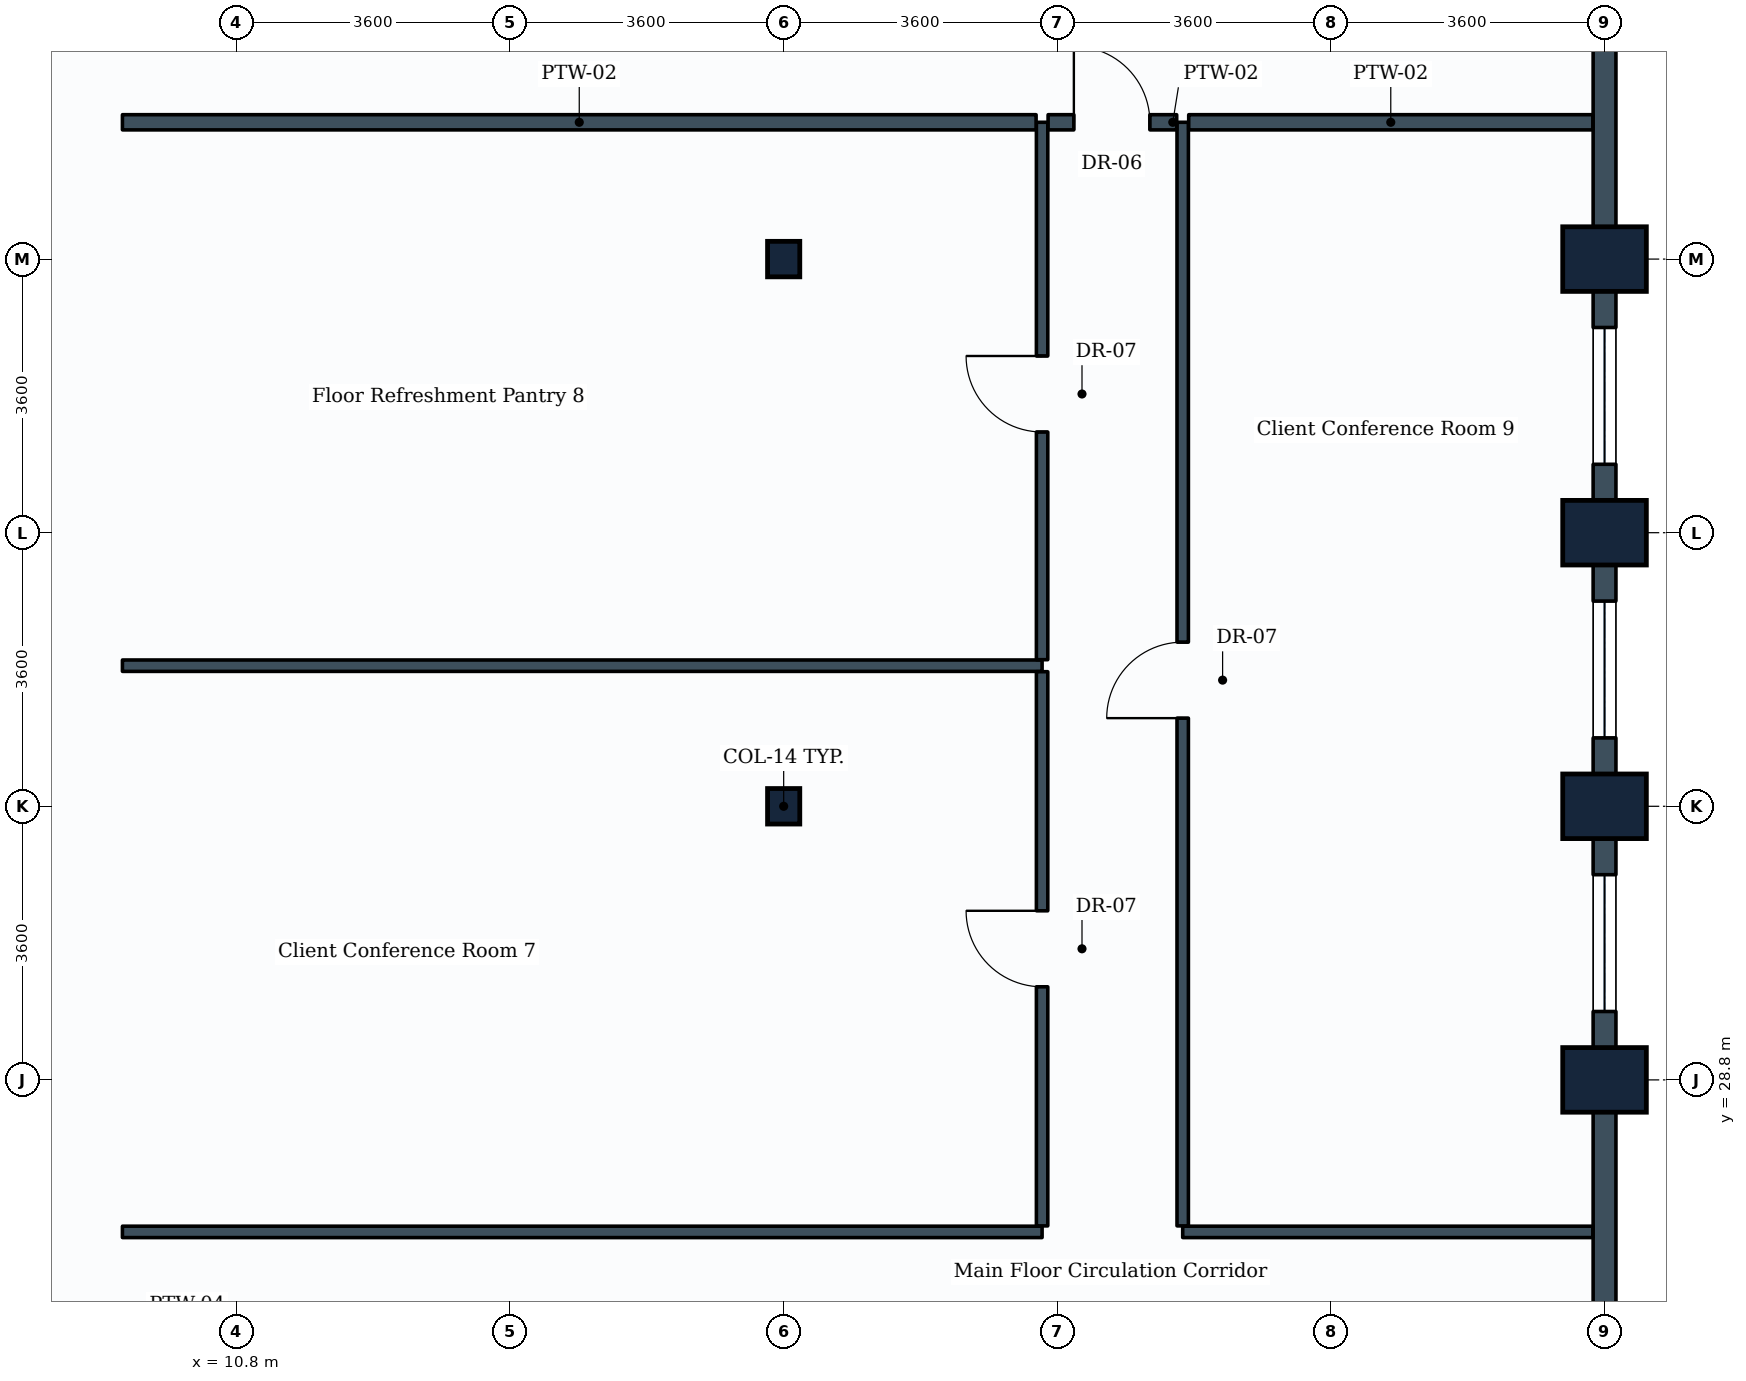
"""IFC4 building model, lengths in metres.
Left out: names, types, materials, properties, quantities, classifications, styles, units other than length and angle.
Written with IfcOpenShell. Run it as: python <this file> out.ifc"""

import sys

from ifc_helpers import new_model, si_unit, direction, frame, frame_2d, origin, origin_2d, place, context, subcontext, project, spatial, rectangle, i_section, extrude, element, fill, save


model = new_model("IFC4")
c1 = context("Model", 3, precision=1e-05, world=origin(), true_north=direction((0.0, 1.0)))
c2 = subcontext(c1, "Body", "Model", "MODEL_VIEW")
j1 = project(units=[si_unit("LENGTHUNIT", "METRE"), si_unit("PLANEANGLEUNIT", "RADIAN")], contexts=[c1])
p1 = place(None, origin())
s1 = spatial("IfcSite", under=j1, at=p1, CompositionType="ELEMENT")
p2 = place(p1, origin())
s2 = spatial("IfcBuilding", under=s1, at=p2, CompositionType="ELEMENT")
p3 = place(p2, frame((0.0, 0.0, 87.9)))
s3 = spatial("IfcBuildingStorey", under=s2, at=p3, CompositionType="ELEMENT", Elevation=87.9)
for number, where, z_axis, x_axis in (
    (1, (18.0, 32.4, 0.0), (0.0, 0.0, 1.0), (1.0, 0.0, 0.0)),
    (2, (18.0, 39.6, 0.0), (0.0, 0.0, 1.0), (1.0, 0.0, 0.0)),
):
    element("IfcColumn", number, at=place(p3, frame(where, z_axis=z_axis, x_axis=x_axis)), inside=s3, PredefinedType="COLUMN", context=c2, shape_type="SweptSolid", body=[
        extrude(i_section(OverallWidth=0.424, OverallDepth=0.467, WebThickness=0.033, FlangeThickness=0.053, FilletRadius=0.015, at=origin_2d()), origin(), (0.0, 0.0, 1.0), 3.9),
    ])
for number, where, z_axis, x_axis in (
    (3, (28.8, 28.8, 0.0), (0.0, 0.0, 1.0), (0.0, 1.0, 0.0)),
    (4, (28.8, 32.4, 0.0), (0.0, 0.0, 1.0), (0.0, 1.0, 0.0)),
    (5, (28.8, 36.0, 0.0), (0.0, 0.0, 1.0), (0.0, 1.0, 0.0)),
    (6, (28.8, 39.6, 0.0), (0.0, 0.0, 1.0), (0.0, 1.0, 0.0)),
):
    element("IfcColumn", number, at=place(p3, frame(where, z_axis=z_axis, x_axis=x_axis)), inside=s3, PredefinedType="COLUMN", context=c2, shape_type="SweptSolid", body=[
        extrude(rectangle(XDim=0.85, YDim=1.1, at=origin_2d()), origin(), (0.0, 0.0, 1.0), 3.9),
    ])
p4 = place(p3, frame((28.8, 28.8, 0.0), z_axis=(0.0, 0.0, 1.0), x_axis=(0.0, -1.0, 0.0)))
e7 = element("IfcWall", 7, at=p4, inside=s3, PredefinedType="STANDARD", context=c2, shape_type="SweptSolid", body=[
    extrude(rectangle(XDim=3.6, YDim=0.3, at=frame_2d((1.8, 0.0))), origin(), (0.0, 0.0, 1.0), 3.19),
])
p5 = place(p3, frame((28.8, 32.4, 0.0), z_axis=(0.0, 0.0, 1.0), x_axis=(0.0, -1.0, 0.0)))
e8 = element("IfcWall", 8, at=p5, inside=s3, PredefinedType="STANDARD", context=c2, shape_type="SweptSolid", body=[
    extrude(rectangle(XDim=3.6, YDim=0.3, at=frame_2d((1.8, 0.0))), origin(), (0.0, 0.0, 1.0), 2.93),
])
p6 = place(p5, frame((0.9, 0.0, 0.85)))
e9 = element("IfcOpeningElement", 9, at=p6, cuts=e8, PredefinedType="OPENING", context=c2, shape_type="SweptSolid", body=[
    extrude(rectangle(XDim=1.8, YDim=1.35, at=frame_2d((0.9, 0.675))), frame((0.0, 0.16, 0.0), z_axis=(0.0, -1.0, 0.0), x_axis=(1.0, 0.0, 0.0)), (0.0, 0.0, 1.0), 0.32),
])
p7 = place(p3, frame((28.8, 36.0, 0.0), z_axis=(0.0, 0.0, 1.0), x_axis=(0.0, -1.0, 0.0)))
e10 = element("IfcWall", 10, at=p7, inside=s3, PredefinedType="STANDARD", context=c2, shape_type="SweptSolid", body=[
    extrude(rectangle(XDim=3.6, YDim=0.3, at=frame_2d((1.8, 0.0))), origin(), (0.0, 0.0, 1.0), 2.93),
])
p8 = place(p7, frame((0.9, 0.0, 0.85)))
e11 = element("IfcOpeningElement", 11, at=p8, cuts=e10, PredefinedType="OPENING", context=c2, shape_type="SweptSolid", body=[
    extrude(rectangle(XDim=1.8, YDim=1.35, at=frame_2d((0.9, 0.675))), frame((0.0, 0.16, 0.0), z_axis=(0.0, -1.0, 0.0), x_axis=(1.0, 0.0, 0.0)), (0.0, 0.0, 1.0), 0.32),
])
p9 = place(p3, frame((28.8, 39.6, 0.0), z_axis=(0.0, 0.0, 1.0), x_axis=(0.0, -1.0, 0.0)))
e12 = element("IfcWall", 12, at=p9, inside=s3, PredefinedType="STANDARD", context=c2, shape_type="SweptSolid", body=[
    extrude(rectangle(XDim=3.6, YDim=0.3, at=frame_2d((1.8, 0.0))), origin(), (0.0, 0.0, 1.0), 2.93),
])
p10 = place(p9, frame((0.9, 0.0, 0.85)))
e13 = element("IfcOpeningElement", 13, at=p10, cuts=e12, PredefinedType="OPENING", context=c2, shape_type="SweptSolid", body=[
    extrude(rectangle(XDim=1.8, YDim=1.35, at=frame_2d((0.9, 0.675))), frame((0.0, 0.16, 0.0), z_axis=(0.0, -1.0, 0.0), x_axis=(1.0, 0.0, 0.0)), (0.0, 0.0, 1.0), 0.32),
])
p11 = place(p3, frame((28.8, 43.2, 0.0), z_axis=(0.0, 0.0, 1.0), x_axis=(0.0, -1.0, 0.0)))
e14 = element("IfcWall", 14, at=p11, inside=s3, PredefinedType="STANDARD", context=c2, shape_type="SweptSolid", body=[
    extrude(rectangle(XDim=3.6, YDim=0.3, at=frame_2d((1.8, 0.0))), origin(), (0.0, 0.0, 1.0), 2.93),
])
for number, where, z_axis, x_axis in (
    (15, (9.3, 26.8, 0.0), (0.0, 0.0, 1.0), (1.0, 0.0, 0.0)),
    (16, (9.3, 34.25, 0.0), (0.0, 0.0, 1.0), (1.0, 0.0, 0.0)),
):
    element("IfcWall", number, at=place(p3, frame(where, z_axis=z_axis, x_axis=x_axis)), inside=s3, PredefinedType="PARTITIONING", context=c2, shape_type="SweptSolid", body=[
        extrude(rectangle(XDim=12.1, YDim=0.15, at=frame_2d((6.05, 0.0))), origin(), (0.0, 0.0, 1.0), 3.18),
    ])
p12 = place(p3, frame((21.4, 26.879, 0.0), z_axis=(0.0, 0.0, 1.0), x_axis=(0.0, 1.0, 0.0)))
e17 = element("IfcWall", 17, at=p12, inside=s3, PredefinedType="PARTITIONING", context=c2, shape_type="SweptSolid", body=[
    extrude(rectangle(XDim=7.292, YDim=0.15, at=frame_2d((3.646, 0.0))), origin(), (0.0, 0.0, 1.0), 3.19),
])
p13 = place(p12, frame((3.146, 0.0, 0.0)))
e18 = element("IfcOpeningElement", 18, at=p13, cuts=e17, PredefinedType="OPENING", context=c2, shape_type="SweptSolid", body=[
    extrude(rectangle(XDim=1.0, YDim=2.1, at=frame_2d((0.5, 1.05))), frame((0.0, 0.085, 0.0), z_axis=(0.0, -1.0, 0.0), x_axis=(1.0, 0.0, 0.0)), (0.0, 0.0, 1.0), 0.17),
])
p14 = place(p3, frame((21.4, 34.329, 0.0), z_axis=(0.0, 0.0, 1.0), x_axis=(0.0, 1.0, 0.0)))
e19 = element("IfcWall", 19, at=p14, inside=s3, PredefinedType="PARTITIONING", context=c2, shape_type="SweptSolid", body=[
    extrude(rectangle(XDim=7.071, YDim=0.15, at=frame_2d((3.535, 0.0))), origin(), (0.0, 0.0, 1.0), 3.18),
])
p15 = place(p14, frame((2.996, 0.0, 0.0)))
e20 = element("IfcOpeningElement", 20, at=p15, cuts=e19, PredefinedType="OPENING", context=c2, shape_type="SweptSolid", body=[
    extrude(rectangle(XDim=1.0, YDim=2.1, at=frame_2d((0.5, 1.05))), frame((0.0, 0.085, 0.0), z_axis=(0.0, -1.0, 0.0), x_axis=(1.0, 0.0, 0.0)), (0.0, 0.0, 1.0), 0.17),
])
p16 = place(p3, frame((23.25, 26.8, 0.0), z_axis=(0.0, 0.0, 1.0), x_axis=(1.0, 0.0, 0.0)))
e21 = element("IfcWall", 21, at=p16, inside=s3, PredefinedType="PARTITIONING", context=c2, shape_type="SweptSolid", body=[
    extrude(rectangle(XDim=5.396, YDim=0.15, at=frame_2d((2.698, 0.0))), origin(), (0.0, 0.0, 1.0), 3.635),
])
p17 = place(p3, frame((23.25, 26.879, 0.0), z_axis=(0.0, 0.0, 1.0), x_axis=(0.0, 1.0, 0.0)))
e22 = element("IfcWall", 22, at=p17, inside=s3, PredefinedType="PARTITIONING", context=c2, shape_type="SweptSolid", body=[
    extrude(rectangle(XDim=14.521, YDim=0.15, at=frame_2d((7.26, 0.0))), origin(), (0.0, 0.0, 1.0), 3.19),
])
p18 = place(p17, frame((6.681, 0.0, 0.0)))
e23 = element("IfcOpeningElement", 23, at=p18, cuts=e22, PredefinedType="OPENING", context=c2, shape_type="SweptSolid", body=[
    extrude(rectangle(XDim=1.0, YDim=2.1, at=frame_2d((0.5, 1.05))), frame((0.0, 0.085, 0.0), z_axis=(0.0, -1.0, 0.0), x_axis=(1.0, 0.0, 0.0)), (0.0, 0.0, 1.0), 0.17),
])
p19 = place(p3, frame((9.3, 41.4, 0.0), z_axis=(0.0, 0.0, 1.0), x_axis=(1.0, 0.0, 0.0)))
e24 = element("IfcWall", 24, at=p19, inside=s3, PredefinedType="PARTITIONING", context=c2, shape_type="SweptSolid", body=[
    extrude(rectangle(XDim=12.021, YDim=0.2, at=frame_2d((6.01, 0.0))), origin(), (0.0, 0.0, 1.0), 3.18),
])
p20 = place(p3, frame((23.329, 41.4, 0.0), z_axis=(0.0, 0.0, 1.0), x_axis=(1.0, 0.0, 0.0)))
e25 = element("IfcWall", 25, at=p20, inside=s3, PredefinedType="PARTITIONING", context=c2, shape_type="SweptSolid", body=[
    extrude(rectangle(XDim=5.317, YDim=0.2, at=frame_2d((2.658, 0.0))), origin(), (0.0, 0.0, 1.0), 2.93),
])
p21 = place(p3, frame((21.479, 41.4, 0.0), z_axis=(0.0, 0.0, 1.0), x_axis=(1.0, 0.0, 0.0)))
e26 = element("IfcWall", 26, at=p21, inside=s3, PredefinedType="PARTITIONING", context=c2, shape_type="SweptSolid", body=[
    extrude(rectangle(XDim=1.692, YDim=0.2, at=frame_2d((0.846, 0.0))), origin(), (0.0, 0.0, 1.0), 3.635),
])
p22 = place(p21, frame((0.339, 0.0, 0.0)))
e27 = element("IfcOpeningElement", 27, at=p22, cuts=e26, PredefinedType="OPENING", context=c2, shape_type="SweptSolid", body=[
    extrude(rectangle(XDim=1.0, YDim=2.1, at=frame_2d((0.5, 1.05))), frame((0.0, 0.11, 0.0), z_axis=(0.0, -1.0, 0.0), x_axis=(1.0, 0.0, 0.0)), (0.0, 0.0, 1.0), 0.22),
])
p23 = place(p6, origin())
e28 = element("IfcWindow", 28, at=p23, inside=s3, PartitioningType="SINGLE_PANEL", PredefinedType="WINDOW", context=c2, shape_type="SweptSolid", body=[
    extrude(rectangle(XDim=1.8, YDim=1.35, at=frame_2d((0.9, 0.675))), frame((0.0, 0.03, 0.0), z_axis=(0.0, -1.0, 0.0), x_axis=(1.0, 0.0, 0.0)), (0.0, 0.0, 1.0), 0.06),
])
fill(e9, e28)
p24 = place(p8, origin())
e29 = element("IfcWindow", 29, at=p24, inside=s3, PartitioningType="SINGLE_PANEL", PredefinedType="WINDOW", context=c2, shape_type="SweptSolid", body=[
    extrude(rectangle(XDim=1.8, YDim=1.35, at=frame_2d((0.9, 0.675))), frame((0.0, 0.03, 0.0), z_axis=(0.0, -1.0, 0.0), x_axis=(1.0, 0.0, 0.0)), (0.0, 0.0, 1.0), 0.06),
])
fill(e11, e29)
p25 = place(p10, origin())
e30 = element("IfcWindow", 30, at=p25, inside=s3, PartitioningType="SINGLE_PANEL", PredefinedType="WINDOW", context=c2, shape_type="SweptSolid", body=[
    extrude(rectangle(XDim=1.8, YDim=1.35, at=frame_2d((0.9, 0.675))), frame((0.0, 0.03, 0.0), z_axis=(0.0, -1.0, 0.0), x_axis=(1.0, 0.0, 0.0)), (0.0, 0.0, 1.0), 0.06),
])
fill(e13, e30)
p26 = place(p13, origin())
e31 = element("IfcDoor", 31, at=p26, inside=s3, OperationType="SINGLE_SWING_RIGHT", PredefinedType="DOOR", context=c2, shape_type="SweptSolid", body=[
    extrude(rectangle(XDim=1.0, YDim=2.1, at=frame_2d((0.5, 1.05))), frame((0.0, 0.025, 0.0), z_axis=(0.0, -1.0, 0.0), x_axis=(1.0, 0.0, 0.0)), (0.0, 0.0, 1.0), 0.05),
])
fill(e18, e31)
p27 = place(p15, origin())
e32 = element("IfcDoor", 32, at=p27, inside=s3, OperationType="SINGLE_SWING_RIGHT", PredefinedType="DOOR", context=c2, shape_type="SweptSolid", body=[
    extrude(rectangle(XDim=1.0, YDim=2.1, at=frame_2d((0.5, 1.05))), frame((0.0, 0.025, 0.0), z_axis=(0.0, -1.0, 0.0), x_axis=(1.0, 0.0, 0.0)), (0.0, 0.0, 1.0), 0.05),
])
fill(e20, e32)
p28 = place(p18, origin())
e33 = element("IfcDoor", 33, at=p28, inside=s3, OperationType="SINGLE_SWING_LEFT", PredefinedType="DOOR", context=c2, shape_type="SweptSolid", body=[
    extrude(rectangle(XDim=1.0, YDim=2.1, at=frame_2d((0.5, 1.05))), frame((0.0, 0.025, 0.0), z_axis=(0.0, -1.0, 0.0), x_axis=(1.0, 0.0, 0.0)), (0.0, 0.0, 1.0), 0.05),
])
fill(e23, e33)
p29 = place(p22, origin())
e34 = element("IfcDoor", 34, at=p29, inside=s3, OperationType="SINGLE_SWING_LEFT", PredefinedType="DOOR", context=c2, shape_type="SweptSolid", body=[
    extrude(rectangle(XDim=1.0, YDim=2.1, at=frame_2d((0.5, 1.05))), frame((0.0, 0.025, 0.0), z_axis=(0.0, -1.0, 0.0), x_axis=(1.0, 0.0, 0.0)), (0.0, 0.0, 1.0), 0.05),
])
fill(e27, e34)
save(model, sys.argv[1])
